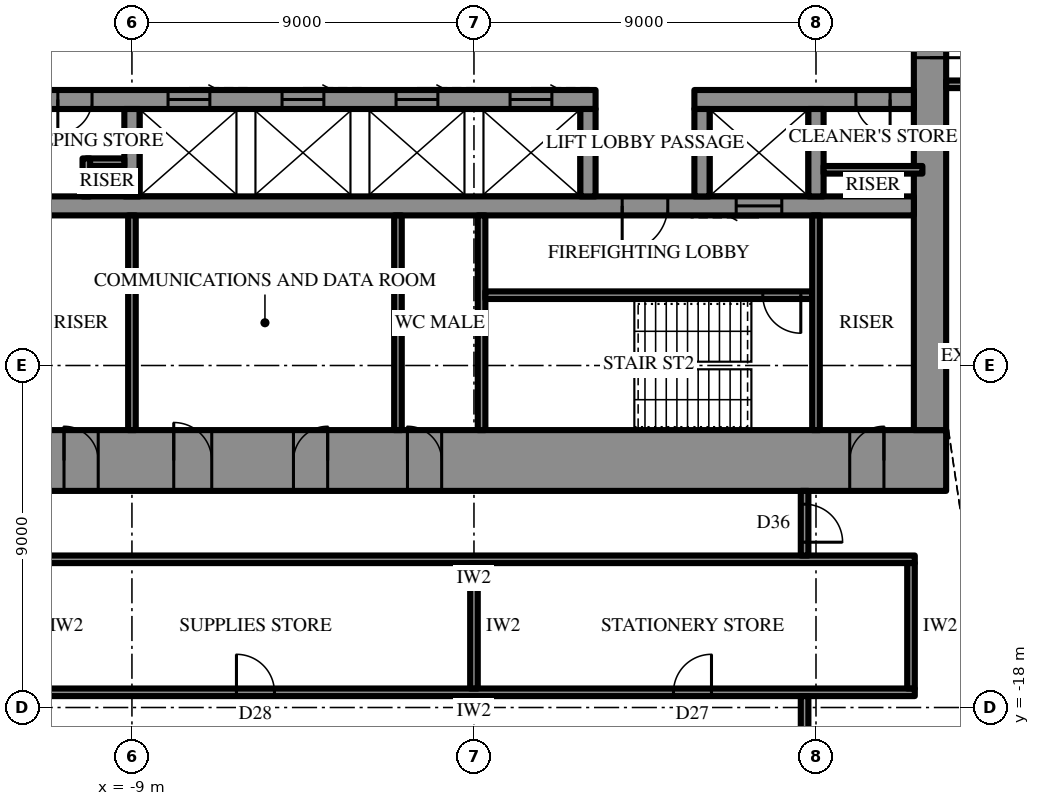
"""IFC4 building model, lengths in metres.
Left out: names, types, materials, properties, quantities, classifications, styles, units other than length and angle.
Written with IfcOpenShell. Run it as: python <this file> out.ifc"""

import sys

from ifc_helpers import new_model, si_unit, direction, frame, frame_2d, origin, place, context, subcontext, project, spatial, rectangle, extrude, element, fill, save


model = new_model("IFC4")
c1 = context("Model", 3, precision=1e-05, world=origin(), true_north=direction((0.0, 1.0)))
c2 = subcontext(c1, "Body", "Model", "MODEL_VIEW")
j1 = project(units=[si_unit("LENGTHUNIT", "METRE"), si_unit("PLANEANGLEUNIT", "RADIAN")], contexts=[c1])
p1 = place(None, origin())
s1 = spatial("IfcSite", under=j1, at=p1, CompositionType="ELEMENT")
p2 = place(p1, origin())
s2 = spatial("IfcBuilding", under=s1, at=p2, CompositionType="ELEMENT")
p3 = place(p2, frame((0.0, 0.0, 345.1)))
s3 = spatial("IfcBuildingStorey", under=s2, at=p3, CompositionType="ELEMENT", Elevation=345.1)
p4 = place(p3, frame((12.425, -11.5, 0.0), z_axis=(0.0, 0.0, 1.0), x_axis=(-1.0, 0.0, 0.0)))
e1 = element("IfcWall", 1, at=p4, inside=s3, PredefinedType="SHEAR", context=c2, shape_type="SweptSolid", body=[
    extrude(rectangle(XDim=24.85, YDim=1.6, at=frame_2d((12.425, 0.0))), origin(), (0.0, 0.0, 1.0), 4.2),
])
p5 = place(p4, frame((13.275, 0.0, 0.0)))
e2 = element("IfcOpeningElement", 2, at=p5, cuts=e1, PredefinedType="OPENING", context=c2, shape_type="SweptSolid", body=[
    extrude(rectangle(XDim=0.9, YDim=2.2, at=frame_2d((0.45, 1.1))), frame((0.0, 0.81, 0.0), z_axis=(0.0, -1.0, 0.0), x_axis=(1.0, 0.0, 0.0)), (0.0, 0.0, 1.0), 1.62),
])
p6 = place(p4, frame((16.275, 0.0, 0.0)))
e3 = element("IfcOpeningElement", 3, at=p6, cuts=e1, PredefinedType="OPENING", context=c2, shape_type="SweptSolid", body=[
    extrude(rectangle(XDim=0.9, YDim=2.2, at=frame_2d((0.45, 1.1))), frame((0.0, 0.81, 0.0), z_axis=(0.0, -1.0, 0.0), x_axis=(1.0, 0.0, 0.0)), (0.0, 0.0, 1.0), 1.62),
])
p7 = place(p4, frame((19.325, 0.0, 0.0)))
e4 = element("IfcOpeningElement", 4, at=p7, cuts=e1, PredefinedType="OPENING", context=c2, shape_type="SweptSolid", body=[
    extrude(rectangle(XDim=1.0, YDim=2.2, at=frame_2d((0.5, 1.1))), frame((0.0, 0.81, 0.0), z_axis=(0.0, -1.0, 0.0), x_axis=(1.0, 0.0, 0.0)), (0.0, 0.0, 1.0), 1.62),
])
p8 = place(p4, frame((1.637, 0.0, 0.0)))
e5 = element("IfcOpeningElement", 5, at=p8, cuts=e1, PredefinedType="OPENING", context=c2, shape_type="SweptSolid", body=[
    extrude(rectangle(XDim=0.9, YDim=2.2, at=frame_2d((0.45, 1.1))), frame((0.0, 0.81, 0.0), z_axis=(0.0, -1.0, 0.0), x_axis=(1.0, 0.0, 0.0)), (0.0, 0.0, 1.0), 1.62),
])
p9 = place(p4, frame((22.312, 0.0, 0.0)))
e6 = element("IfcOpeningElement", 6, at=p9, cuts=e1, PredefinedType="OPENING", context=c2, shape_type="SweptSolid", body=[
    extrude(rectangle(XDim=0.9, YDim=2.2, at=frame_2d((0.45, 1.1))), frame((0.0, 0.81, 0.0), z_axis=(0.0, -1.0, 0.0), x_axis=(1.0, 0.0, 0.0)), (0.0, 0.0, 1.0), 1.62),
])
p10 = place(p3, frame((12.0, -10.7, 0.0), z_axis=(0.0, 0.0, 1.0), x_axis=(0.0, 1.0, 0.0)))
e7 = element("IfcWall", 7, at=p10, inside=s3, PredefinedType="SHEAR", context=c2, shape_type="SweptSolid", body=[
    extrude(rectangle(XDim=21.4, YDim=0.85, at=frame_2d((10.7, 0.0))), origin(), (0.0, 0.0, 1.0), 4.2),
])
p11 = place(p10, frame((9.8, 0.0, 0.0)))
e8 = element("IfcOpeningElement", 8, at=p11, cuts=e7, PredefinedType="OPENING", context=c2, shape_type="SweptSolid", body=[
    extrude(rectangle(XDim=1.8, YDim=2.4, at=frame_2d((0.9, 1.2))), frame((0.0, 0.435, 0.0), z_axis=(0.0, -1.0, 0.0), x_axis=(1.0, 0.0, 0.0)), (0.0, 0.0, 1.0), 0.87),
])
p12 = place(p3, frame((11.575, -2.0, 0.0), z_axis=(0.0, 0.0, 1.0), x_axis=(-1.0, 0.0, 0.0)))
e9 = element("IfcWall", 9, at=p12, inside=s3, PredefinedType="SHEAR", context=c2, shape_type="SweptSolid", body=[
    extrude(rectangle(XDim=5.775, YDim=0.5, at=frame_2d((2.887, 0.0))), origin(), (0.0, 0.0, 1.0), 4.2),
])
p13 = place(p12, frame((0.625, 0.0, 0.0)))
e10 = element("IfcOpeningElement", 10, at=p13, cuts=e9, PredefinedType="OPENING", context=c2, shape_type="SweptSolid", body=[
    extrude(rectangle(XDim=0.9, YDim=2.2, at=frame_2d((0.45, 1.1))), frame((0.0, 0.26, 0.0), z_axis=(0.0, -1.0, 0.0), x_axis=(1.0, 0.0, 0.0)), (0.0, 0.0, 1.0), 0.52),
])
p14 = place(p3, frame((3.2, -2.0, 0.0), z_axis=(0.0, 0.0, 1.0), x_axis=(-1.0, 0.0, 0.0)))
e11 = element("IfcWall", 11, at=p14, inside=s3, PredefinedType="SHEAR", context=c2, shape_type="SweptSolid", body=[
    extrude(rectangle(XDim=14.775, YDim=0.5, at=frame_2d((7.387, 0.0))), origin(), (0.0, 0.0, 1.0), 4.2),
])
p15 = place(p14, frame((13.25, 0.0, 0.0)))
e12 = element("IfcOpeningElement", 12, at=p15, cuts=e11, PredefinedType="OPENING", context=c2, shape_type="SweptSolid", body=[
    extrude(rectangle(XDim=0.9, YDim=2.2, at=frame_2d((0.45, 1.1))), frame((0.0, 0.26, 0.0), z_axis=(0.0, -1.0, 0.0), x_axis=(1.0, 0.0, 0.0)), (0.0, 0.0, 1.0), 0.52),
])
p16 = place(p14, frame((1.15, 0.0, 0.0)))
e13 = element("IfcOpeningElement", 13, at=p16, cuts=e11, PredefinedType="OPENING", context=c2, shape_type="SweptSolid", body=[
    extrude(rectangle(XDim=1.1, YDim=2.2, at=frame_2d((0.55, 1.1))), frame((0.0, 0.26, 0.0), z_axis=(0.0, -1.0, 0.0), x_axis=(1.0, 0.0, 0.0)), (0.0, 0.0, 1.0), 0.52),
])
p17 = place(p14, frame((4.15, 0.0, 0.0)))
e14 = element("IfcOpeningElement", 14, at=p17, cuts=e11, PredefinedType="OPENING", context=c2, shape_type="SweptSolid", body=[
    extrude(rectangle(XDim=1.1, YDim=2.2, at=frame_2d((0.55, 1.1))), frame((0.0, 0.26, 0.0), z_axis=(0.0, -1.0, 0.0), x_axis=(1.0, 0.0, 0.0)), (0.0, 0.0, 1.0), 0.52),
])
p18 = place(p14, frame((7.15, 0.0, 0.0)))
e15 = element("IfcOpeningElement", 15, at=p18, cuts=e11, PredefinedType="OPENING", context=c2, shape_type="SweptSolid", body=[
    extrude(rectangle(XDim=1.1, YDim=2.2, at=frame_2d((0.55, 1.1))), frame((0.0, 0.26, 0.0), z_axis=(0.0, -1.0, 0.0), x_axis=(1.0, 0.0, 0.0)), (0.0, 0.0, 1.0), 0.52),
])
p19 = place(p14, frame((10.15, 0.0, 0.0)))
e16 = element("IfcOpeningElement", 16, at=p19, cuts=e11, PredefinedType="OPENING", context=c2, shape_type="SweptSolid", body=[
    extrude(rectangle(XDim=1.1, YDim=2.2, at=frame_2d((0.55, 1.1))), frame((0.0, 0.26, 0.0), z_axis=(0.0, -1.0, 0.0), x_axis=(1.0, 0.0, 0.0)), (0.0, 0.0, 1.0), 0.52),
])
p20 = place(p3, frame((11.575, -4.8, 0.0), z_axis=(0.0, 0.0, 1.0), x_axis=(-1.0, 0.0, 0.0)))
e17 = element("IfcWall", 17, at=p20, inside=s3, PredefinedType="SHEAR", context=c2, shape_type="SweptSolid", body=[
    extrude(rectangle(XDim=23.15, YDim=0.5, at=frame_2d((11.575, 0.0))), origin(), (0.0, 0.0, 1.0), 4.2),
])
p21 = place(p20, frame((6.475, 0.0, 0.0)))
e18 = element("IfcOpeningElement", 18, at=p21, cuts=e17, PredefinedType="OPENING", context=c2, shape_type="SweptSolid", body=[
    extrude(rectangle(XDim=1.2, YDim=2.2, at=frame_2d((0.6, 1.1))), frame((0.0, 0.26, 0.0), z_axis=(0.0, -1.0, 0.0), x_axis=(1.0, 0.0, 0.0)), (0.0, 0.0, 1.0), 0.52),
])
p22 = place(p20, frame((3.475, 0.0, 0.0)))
e19 = element("IfcOpeningElement", 19, at=p22, cuts=e17, PredefinedType="OPENING", context=c2, shape_type="SweptSolid", body=[
    extrude(rectangle(XDim=1.2, YDim=2.2, at=frame_2d((0.6, 1.1))), frame((0.0, 0.26, 0.0), z_axis=(0.0, -1.0, 0.0), x_axis=(1.0, 0.0, 0.0)), (0.0, 0.0, 1.0), 0.52),
])
for number, where, z_axis, x_axis in (
    (20, (9.0, -2.25, 0.0), (0.0, 0.0, 1.0), (0.0, -1.0, 0.0)),
    (21, (6.0, -2.25, 0.0), (0.0, 0.0, 1.0), (0.0, -1.0, 0.0)),
    (22, (3.0, -2.25, 0.0), (0.0, 0.0, 1.0), (0.0, -1.0, 0.0)),
    (23, (-9.0, -2.25, 0.0), (0.0, 0.0, 1.0), (0.0, -1.0, 0.0)),
):
    element("IfcWall", number, at=place(p3, frame(where, z_axis=z_axis, x_axis=x_axis)), inside=s3, PredefinedType="SHEAR", context=c2, shape_type="SweptSolid", body=[
        extrude(rectangle(XDim=2.3, YDim=0.4, at=frame_2d((1.15, 0.0))), origin(), (0.0, 0.0, 1.0), 4.2),
    ])
p23 = place(p3, frame((0.2, -5.05, 0.0), z_axis=(0.0, 0.0, 1.0), x_axis=(0.0, -1.0, 0.0)))
e24 = element("IfcWall", 24, at=p23, inside=s3, PredefinedType="SHEAR", context=c2, shape_type="SweptSolid", body=[
    extrude(rectangle(XDim=5.65, YDim=0.2, at=frame_2d((2.825, 0.0))), origin(), (0.0, 0.0, 1.0), 4.2),
])
p24 = place(p3, frame((8.9, -7.15, 0.0), z_axis=(0.0, 0.0, 1.0), x_axis=(-1.0, 0.0, 0.0)))
e25 = element("IfcWall", 25, at=p24, inside=s3, PredefinedType="SHEAR", context=c2, shape_type="SweptSolid", body=[
    extrude(rectangle(XDim=8.6, YDim=0.2, at=frame_2d((4.3, 0.0))), origin(), (0.0, 0.0, 1.0), 4.2),
])
p25 = place(p24, frame((0.3, 0.0, 0.0)))
e26 = element("IfcOpeningElement", 26, at=p25, cuts=e25, PredefinedType="OPENING", context=c2, shape_type="SweptSolid", body=[
    extrude(rectangle(XDim=1.0, YDim=2.2, at=frame_2d((0.5, 1.1))), frame((0.0, 0.11, 0.0), z_axis=(0.0, -1.0, 0.0), x_axis=(1.0, 0.0, 0.0)), (0.0, 0.0, 1.0), 0.22),
])
for number, where, z_axis, x_axis in (
    (27, (9.0, -5.05, 0.0), (0.0, 0.0, 1.0), (0.0, -1.0, 0.0)),
    (28, (-9.0, -5.05, 0.0), (0.0, 0.0, 1.0), (0.0, -1.0, 0.0)),
    (29, (-2.0, -5.05, 0.0), (0.0, 0.0, 1.0), (0.0, -1.0, 0.0)),
):
    element("IfcWall", number, at=place(p3, frame(where, z_axis=z_axis, x_axis=x_axis)), inside=s3, PredefinedType="PARTITIONING", context=c2, shape_type="SweptSolid", body=[
        extrude(rectangle(XDim=5.65, YDim=0.2, at=frame_2d((2.825, 0.0))), origin(), (0.0, 0.0, 1.0), 4.0),
    ])
p26 = place(p3, frame((11.8, -3.85, 0.0), z_axis=(0.0, 0.0, 1.0), x_axis=(-1.0, 0.0, 0.0)))
e30 = element("IfcWall", 30, at=p26, inside=s3, PredefinedType="PARTITIONING", context=c2, shape_type="SweptSolid", body=[
    extrude(rectangle(XDim=2.6, YDim=0.2, at=frame_2d((1.3, 0.0))), origin(), (0.0, 0.0, 1.0), 4.0),
])
for number, where, z_axis, x_axis in (
    (31, (-9.2, -3.65, 0.0), (0.0, 0.0, 1.0), (-1.0, 0.0, 0.0)),
    (32, (-10.2, -3.55, 0.0), (0.0, 0.0, 1.0), (0.0, -1.0, 0.0)),
):
    element("IfcWall", number, at=place(p3, frame(where, z_axis=z_axis, x_axis=x_axis)), inside=s3, PredefinedType="PARTITIONING", context=c2, shape_type="SweptSolid", body=[
        extrude(rectangle(XDim=1.0, YDim=0.2, at=frame_2d((0.5, 0.0))), origin(), (0.0, 0.0, 1.0), 4.0),
    ])
p27 = place(p3, frame((11.6, -14.1, 0.0), z_axis=(0.0, 0.0, 1.0), x_axis=(-1.0, 0.0, 0.0)))
e33 = element("IfcWall", 33, at=p27, inside=s3, PredefinedType="PARTITIONING", context=c2, shape_type="SweptSolid", body=[
    extrude(rectangle(XDim=23.2, YDim=0.2, at=frame_2d((11.6, 0.0))), origin(), (0.0, 0.0, 1.0), 4.0),
])
p28 = place(p3, frame((11.6, -17.6, 0.0), z_axis=(0.0, 0.0, 1.0), x_axis=(-1.0, 0.0, 0.0)))
e34 = element("IfcWall", 34, at=p28, inside=s3, PredefinedType="PARTITIONING", context=c2, shape_type="SweptSolid", body=[
    extrude(rectangle(XDim=23.2, YDim=0.2, at=frame_2d((11.6, 0.0))), origin(), (0.0, 0.0, 1.0), 4.0),
])
p29 = place(p28, frame((5.35, 0.0, 0.0)))
e35 = element("IfcOpeningElement", 35, at=p29, cuts=e34, PredefinedType="OPENING", context=c2, shape_type="SweptSolid", body=[
    extrude(rectangle(XDim=1.0, YDim=2.2, at=frame_2d((0.5, 1.1))), frame((0.0, 0.11, 0.0), z_axis=(0.0, -1.0, 0.0), x_axis=(1.0, 0.0, 0.0)), (0.0, 0.0, 1.0), 0.22),
])
p30 = place(p28, frame((16.85, 0.0, 0.0)))
e36 = element("IfcOpeningElement", 36, at=p30, cuts=e34, PredefinedType="OPENING", context=c2, shape_type="SweptSolid", body=[
    extrude(rectangle(XDim=1.0, YDim=2.2, at=frame_2d((0.5, 1.1))), frame((0.0, 0.11, 0.0), z_axis=(0.0, -1.0, 0.0), x_axis=(1.0, 0.0, 0.0)), (0.0, 0.0, 1.0), 0.22),
])
p31 = place(p3, frame((11.5, -14.2, 0.0), z_axis=(0.0, 0.0, 1.0), x_axis=(0.0, -1.0, 0.0)))
e37 = element("IfcWall", 37, at=p31, inside=s3, PredefinedType="PARTITIONING", context=c2, shape_type="SweptSolid", body=[
    extrude(rectangle(XDim=3.3, YDim=0.2, at=frame_2d((1.65, 0.0))), origin(), (0.0, 0.0, 1.0), 4.0),
])
p32 = place(p3, frame((0.0, -14.2, 0.0), z_axis=(0.0, 0.0, 1.0), x_axis=(0.0, -1.0, 0.0)))
e38 = element("IfcWall", 38, at=p32, inside=s3, PredefinedType="PARTITIONING", context=c2, shape_type="SweptSolid", body=[
    extrude(rectangle(XDim=3.3, YDim=0.2, at=frame_2d((1.65, 0.0))), origin(), (0.0, 0.0, 1.0), 2.992),
])
p33 = place(p3, frame((8.7, -12.3, 0.0), z_axis=(0.0, 0.0, 1.0), x_axis=(0.0, -1.0, 0.0)))
e39 = element("IfcWall", 39, at=p33, inside=s3, PredefinedType="PARTITIONING", context=c2, shape_type="SweptSolid", body=[
    extrude(rectangle(XDim=1.7, YDim=0.2, at=frame_2d((0.85, 0.0))), origin(), (0.0, 0.0, 1.0), 2.992),
])
p34 = place(p33, frame((0.35, 0.0, 0.0)))
e40 = element("IfcOpeningElement", 40, at=p34, cuts=e39, PredefinedType="OPENING", context=c2, shape_type="SweptSolid", body=[
    extrude(rectangle(XDim=1.0, YDim=2.2, at=frame_2d((0.5, 1.1))), frame((0.0, 0.11, 0.0), z_axis=(0.0, -1.0, 0.0), x_axis=(1.0, 0.0, 0.0)), (0.0, 0.0, 1.0), 0.22),
])
p35 = place(p3, frame((8.7, -17.7, 0.0), z_axis=(0.0, 0.0, 1.0), x_axis=(0.0, -1.0, 0.0)))
e41 = element("IfcWall", 41, at=p35, inside=s3, PredefinedType="PARTITIONING", context=c2, shape_type="SweptSolid", body=[
    extrude(rectangle(XDim=8.15, YDim=0.2, at=frame_2d((4.075, 0.0))), origin(), (0.0, 0.0, 1.0), 2.992),
])
p36 = place(p3, frame((12.425, -1.6, 0.0), z_axis=(0.0, 0.0, 1.0), x_axis=(1.0, 0.0, 0.0)))
e42 = element("IfcWall", 42, at=p36, inside=s3, PredefinedType="PARTITIONING", context=c2, shape_type="SweptSolid", body=[
    extrude(rectangle(XDim=16.5, YDim=0.2, at=frame_2d((8.25, 0.0))), origin(), (0.0, 0.0, 1.0), 4.0),
])
p37 = place(p36, frame((1.15, 0.0, 0.0)))
e43 = element("IfcOpeningElement", 43, at=p37, cuts=e42, PredefinedType="OPENING", context=c2, shape_type="SweptSolid", body=[
    extrude(rectangle(XDim=1.0, YDim=2.2, at=frame_2d((0.5, 1.1))), frame((0.0, 0.11, 0.0), z_axis=(0.0, -1.0, 0.0), x_axis=(1.0, 0.0, 0.0)), (0.0, 0.0, 1.0), 0.22),
])
p38 = place(p11, frame((1.8, 0.0, 0.0), z_axis=(0.0, 0.0, 1.0), x_axis=(-1.0, 0.0, 0.0)))
e44 = element("IfcDoor", 44, at=p38, inside=s3, OperationType="DOUBLE_DOOR_SINGLE_SWING", PredefinedType="DOOR", context=c2, shape_type="SweptSolid", body=[
    extrude(rectangle(XDim=1.8, YDim=2.4, at=frame_2d((0.9, 1.2))), frame((0.0, 0.025, 0.0), z_axis=(0.0, -1.0, 0.0), x_axis=(1.0, 0.0, 0.0)), (0.0, 0.0, 1.0), 0.05),
])
fill(e8, e44)
p39 = place(p21, origin())
e45 = element("IfcDoor", 45, at=p39, inside=s3, OperationType="SINGLE_SWING_LEFT", PredefinedType="DOOR", context=c2, shape_type="SweptSolid", body=[
    extrude(rectangle(XDim=1.2, YDim=2.2, at=frame_2d((0.6, 1.1))), frame((0.0, 0.025, 0.0), z_axis=(0.0, -1.0, 0.0), x_axis=(1.0, 0.0, 0.0)), (0.0, 0.0, 1.0), 0.05),
])
fill(e18, e45)
p40 = place(p25, origin())
e46 = element("IfcDoor", 46, at=p40, inside=s3, OperationType="SINGLE_SWING_RIGHT", PredefinedType="DOOR", context=c2, shape_type="SweptSolid", body=[
    extrude(rectangle(XDim=1.0, YDim=2.2, at=frame_2d((0.5, 1.1))), frame((0.0, 0.025, 0.0), z_axis=(0.0, -1.0, 0.0), x_axis=(1.0, 0.0, 0.0)), (0.0, 0.0, 1.0), 0.05),
])
fill(e26, e46)
p41 = place(p5, frame((0.9, 0.0, 0.0), z_axis=(0.0, 0.0, 1.0), x_axis=(-1.0, 0.0, 0.0)))
e47 = element("IfcDoor", 47, at=p41, inside=s3, OperationType="SINGLE_SWING_RIGHT", PredefinedType="DOOR", context=c2, shape_type="SweptSolid", body=[
    extrude(rectangle(XDim=0.9, YDim=2.2, at=frame_2d((0.45, 1.1))), frame((0.0, 0.025, 0.0), z_axis=(0.0, -1.0, 0.0), x_axis=(1.0, 0.0, 0.0)), (0.0, 0.0, 1.0), 0.05),
])
fill(e2, e47)
p42 = place(p6, frame((0.9, 0.0, 0.0), z_axis=(0.0, 0.0, 1.0), x_axis=(-1.0, 0.0, 0.0)))
e48 = element("IfcDoor", 48, at=p42, inside=s3, OperationType="SINGLE_SWING_LEFT", PredefinedType="DOOR", context=c2, shape_type="SweptSolid", body=[
    extrude(rectangle(XDim=0.9, YDim=2.2, at=frame_2d((0.45, 1.1))), frame((0.0, 0.025, 0.0), z_axis=(0.0, -1.0, 0.0), x_axis=(1.0, 0.0, 0.0)), (0.0, 0.0, 1.0), 0.05),
])
fill(e3, e48)
p43 = place(p7, frame((1.0, 0.0, 0.0), z_axis=(0.0, 0.0, 1.0), x_axis=(-1.0, 0.0, 0.0)))
e49 = element("IfcDoor", 49, at=p43, inside=s3, OperationType="SINGLE_SWING_RIGHT", PredefinedType="DOOR", context=c2, shape_type="SweptSolid", body=[
    extrude(rectangle(XDim=1.0, YDim=2.2, at=frame_2d((0.5, 1.1))), frame((0.0, 0.025, 0.0), z_axis=(0.0, -1.0, 0.0), x_axis=(1.0, 0.0, 0.0)), (0.0, 0.0, 1.0), 0.05),
])
fill(e4, e49)
p44 = place(p8, frame((0.9, 0.0, 0.0), z_axis=(0.0, 0.0, 1.0), x_axis=(-1.0, 0.0, 0.0)))
e50 = element("IfcDoor", 50, at=p44, inside=s3, OperationType="SINGLE_SWING_LEFT", PredefinedType="DOOR", context=c2, shape_type="SweptSolid", body=[
    extrude(rectangle(XDim=0.9, YDim=2.2, at=frame_2d((0.45, 1.1))), frame((0.0, 0.025, 0.0), z_axis=(0.0, -1.0, 0.0), x_axis=(1.0, 0.0, 0.0)), (0.0, 0.0, 1.0), 0.05),
])
fill(e5, e50)
p45 = place(p9, frame((0.9, 0.0, 0.0), z_axis=(0.0, 0.0, 1.0), x_axis=(-1.0, 0.0, 0.0)))
e51 = element("IfcDoor", 51, at=p45, inside=s3, OperationType="SINGLE_SWING_RIGHT", PredefinedType="DOOR", context=c2, shape_type="SweptSolid", body=[
    extrude(rectangle(XDim=0.9, YDim=2.2, at=frame_2d((0.45, 1.1))), frame((0.0, 0.025, 0.0), z_axis=(0.0, -1.0, 0.0), x_axis=(1.0, 0.0, 0.0)), (0.0, 0.0, 1.0), 0.05),
])
fill(e6, e51)
p46 = place(p13, origin())
e52 = element("IfcDoor", 52, at=p46, inside=s3, OperationType="SINGLE_SWING_RIGHT", PredefinedType="DOOR", context=c2, shape_type="SweptSolid", body=[
    extrude(rectangle(XDim=0.9, YDim=2.2, at=frame_2d((0.45, 1.1))), frame((0.0, 0.025, 0.0), z_axis=(0.0, -1.0, 0.0), x_axis=(1.0, 0.0, 0.0)), (0.0, 0.0, 1.0), 0.05),
])
fill(e10, e52)
p47 = place(p15, origin())
e53 = element("IfcDoor", 53, at=p47, inside=s3, OperationType="SINGLE_SWING_LEFT", PredefinedType="DOOR", context=c2, shape_type="SweptSolid", body=[
    extrude(rectangle(XDim=0.9, YDim=2.2, at=frame_2d((0.45, 1.1))), frame((0.0, 0.025, 0.0), z_axis=(0.0, -1.0, 0.0), x_axis=(1.0, 0.0, 0.0)), (0.0, 0.0, 1.0), 0.05),
])
fill(e12, e53)
p48 = place(p22, origin())
e54 = element("IfcDoor", 54, at=p48, inside=s3, OperationType="SLIDING_TO_LEFT", PredefinedType="DOOR", context=c2, shape_type="SweptSolid", body=[
    extrude(rectangle(XDim=1.2, YDim=2.2, at=frame_2d((0.6, 1.1))), frame((0.0, 0.025, 0.0), z_axis=(0.0, -1.0, 0.0), x_axis=(1.0, 0.0, 0.0)), (0.0, 0.0, 1.0), 0.05),
])
fill(e19, e54)
p49 = place(p16, frame((1.1, 0.0, 0.0), z_axis=(0.0, 0.0, 1.0), x_axis=(-1.0, 0.0, 0.0)))
e55 = element("IfcDoor", 55, at=p49, inside=s3, OperationType="SLIDING_TO_LEFT", PredefinedType="DOOR", context=c2, shape_type="SweptSolid", body=[
    extrude(rectangle(XDim=1.1, YDim=2.2, at=frame_2d((0.55, 1.1))), frame((0.0, 0.025, 0.0), z_axis=(0.0, -1.0, 0.0), x_axis=(1.0, 0.0, 0.0)), (0.0, 0.0, 1.0), 0.05),
])
fill(e13, e55)
p50 = place(p17, frame((1.1, 0.0, 0.0), z_axis=(0.0, 0.0, 1.0), x_axis=(-1.0, 0.0, 0.0)))
e56 = element("IfcDoor", 56, at=p50, inside=s3, OperationType="SLIDING_TO_LEFT", PredefinedType="DOOR", context=c2, shape_type="SweptSolid", body=[
    extrude(rectangle(XDim=1.1, YDim=2.2, at=frame_2d((0.55, 1.1))), frame((0.0, 0.025, 0.0), z_axis=(0.0, -1.0, 0.0), x_axis=(1.0, 0.0, 0.0)), (0.0, 0.0, 1.0), 0.05),
])
fill(e14, e56)
p51 = place(p18, frame((1.1, 0.0, 0.0), z_axis=(0.0, 0.0, 1.0), x_axis=(-1.0, 0.0, 0.0)))
e57 = element("IfcDoor", 57, at=p51, inside=s3, OperationType="SLIDING_TO_LEFT", PredefinedType="DOOR", context=c2, shape_type="SweptSolid", body=[
    extrude(rectangle(XDim=1.1, YDim=2.2, at=frame_2d((0.55, 1.1))), frame((0.0, 0.025, 0.0), z_axis=(0.0, -1.0, 0.0), x_axis=(1.0, 0.0, 0.0)), (0.0, 0.0, 1.0), 0.05),
])
fill(e15, e57)
p52 = place(p19, frame((1.1, 0.0, 0.0), z_axis=(0.0, 0.0, 1.0), x_axis=(-1.0, 0.0, 0.0)))
e58 = element("IfcDoor", 58, at=p52, inside=s3, OperationType="SLIDING_TO_LEFT", PredefinedType="DOOR", context=c2, shape_type="SweptSolid", body=[
    extrude(rectangle(XDim=1.1, YDim=2.2, at=frame_2d((0.55, 1.1))), frame((0.0, 0.025, 0.0), z_axis=(0.0, -1.0, 0.0), x_axis=(1.0, 0.0, 0.0)), (0.0, 0.0, 1.0), 0.05),
])
fill(e16, e58)
p53 = place(p29, frame((1.0, 0.0, 0.0), z_axis=(0.0, 0.0, 1.0), x_axis=(-1.0, 0.0, 0.0)))
e59 = element("IfcDoor", 59, at=p53, inside=s3, OperationType="SINGLE_SWING_LEFT", PredefinedType="DOOR", context=c2, shape_type="SweptSolid", body=[
    extrude(rectangle(XDim=1.0, YDim=2.2, at=frame_2d((0.5, 1.1))), frame((0.0, 0.025, 0.0), z_axis=(0.0, -1.0, 0.0), x_axis=(1.0, 0.0, 0.0)), (0.0, 0.0, 1.0), 0.05),
])
fill(e35, e59)
p54 = place(p30, frame((1.0, 0.0, 0.0), z_axis=(0.0, 0.0, 1.0), x_axis=(-1.0, 0.0, 0.0)))
e60 = element("IfcDoor", 60, at=p54, inside=s3, OperationType="SINGLE_SWING_RIGHT", PredefinedType="DOOR", context=c2, shape_type="SweptSolid", body=[
    extrude(rectangle(XDim=1.0, YDim=2.2, at=frame_2d((0.5, 1.1))), frame((0.0, 0.025, 0.0), z_axis=(0.0, -1.0, 0.0), x_axis=(1.0, 0.0, 0.0)), (0.0, 0.0, 1.0), 0.05),
])
fill(e36, e60)
p55 = place(p34, origin())
e61 = element("IfcDoor", 61, at=p55, inside=s3, OperationType="SINGLE_SWING_LEFT", PredefinedType="DOOR", context=c2, shape_type="SweptSolid", body=[
    extrude(rectangle(XDim=1.0, YDim=2.2, at=frame_2d((0.5, 1.1))), frame((0.0, 0.025, 0.0), z_axis=(0.0, -1.0, 0.0), x_axis=(1.0, 0.0, 0.0)), (0.0, 0.0, 1.0), 0.05),
])
fill(e40, e61)
save(model, sys.argv[1])
